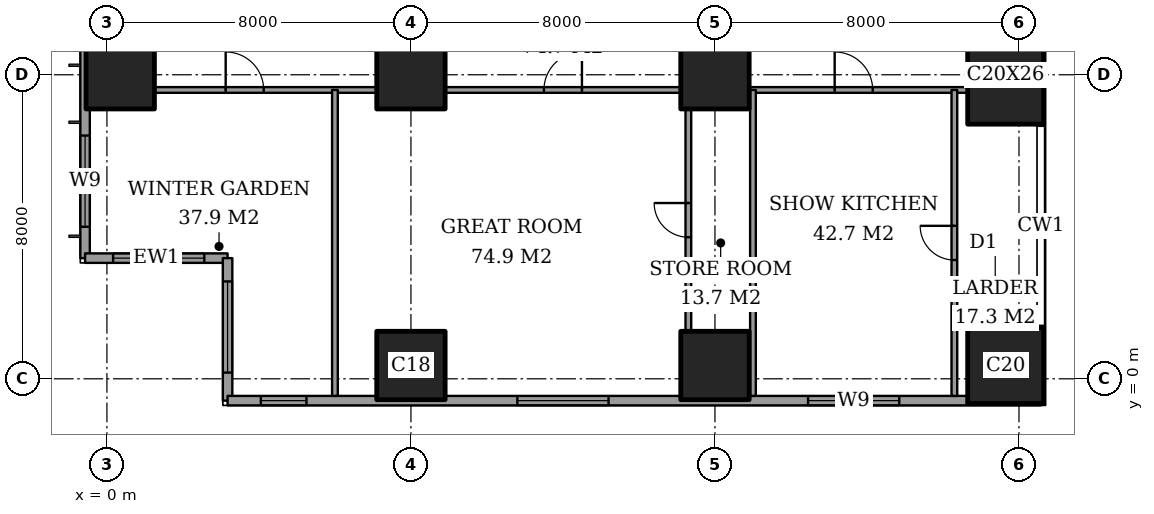
"""IFC4 building model, lengths in metres.
Left out: names, types, materials, properties, quantities, classifications, styles, units other than length and angle.
Written with IfcOpenShell. Run it as: python <this file> out.ifc"""

import sys

from ifc_helpers import new_model, si_unit, direction, frame, frame_2d, origin, origin_2d, place, context, subcontext, project, spatial, rectangle, extrude, element, fill, save


model = new_model("IFC4")
c1 = context("Model", 3, precision=1e-05, world=origin(), true_north=direction((0.0, 1.0)))
c2 = subcontext(c1, "Body", "Model", "MODEL_VIEW")
j1 = project(units=[si_unit("LENGTHUNIT", "METRE"), si_unit("PLANEANGLEUNIT", "RADIAN")], contexts=[c1])
p1 = place(None, origin())
s1 = spatial("IfcSite", under=j1, at=p1, CompositionType="ELEMENT")
p2 = place(p1, origin())
s2 = spatial("IfcBuilding", under=s1, at=p2, CompositionType="ELEMENT")
p3 = place(p2, frame((0.0, 0.0, 214.6)))
s3 = spatial("IfcBuildingStorey", under=s2, at=p3, CompositionType="ELEMENT", Elevation=214.6)
for number, where, z_axis, x_axis in (
    (1, (0.35, 8.0, 0.0), (0.0, 0.0, 1.0), (1.0, 0.0, 0.0)),
    (2, (8.0, 0.35, 0.0), (0.0, 0.0, 1.0), (1.0, 0.0, 0.0)),
    (3, (8.0, 8.0, 0.0), (0.0, 0.0, 1.0), (1.0, 0.0, 0.0)),
    (4, (16.0, 0.35, 0.0), (0.0, 0.0, 1.0), (1.0, 0.0, 0.0)),
    (5, (16.0, 8.0, 0.0), (0.0, 0.0, 1.0), (1.0, 0.0, 0.0)),
):
    element("IfcColumn", number, at=place(p3, frame(where, z_axis=z_axis, x_axis=x_axis)), inside=s3, PredefinedType="COLUMN", context=c2, shape_type="SweptSolid", body=[
        extrude(rectangle(XDim=1.8, YDim=1.8, at=origin_2d()), origin(), (0.0, 0.0, 1.0), 3.6),
    ])
p4 = place(p3, frame((23.65, 0.35, 0.0), z_axis=(0.0, 0.0, 1.0), x_axis=(1.0, 0.0, 0.0)))
e6 = element("IfcColumn", 6, at=p4, inside=s3, PredefinedType="COLUMN", context=c2, shape_type="SweptSolid", body=[
    extrude(rectangle(XDim=2.0, YDim=2.0, at=origin_2d()), origin(), (0.0, 0.0, 1.0), 3.6),
])
p5 = place(p3, frame((23.65, 8.0, 0.0), z_axis=(0.0, 0.0, 1.0), x_axis=(1.0, 0.0, 0.0)))
e7 = element("IfcColumn", 7, at=p5, inside=s3, PredefinedType="COLUMN", context=c2, shape_type="SweptSolid", body=[
    extrude(rectangle(XDim=2.0, YDim=2.6, at=origin_2d()), origin(), (0.0, 0.0, 1.0), 3.6),
])
p6 = place(p3, frame((-0.575, 44.825, 0.0), z_axis=(0.0, 0.0, 1.0), x_axis=(0.0, -1.0, 0.0)))
e8 = element("IfcWall", 8, at=p6, inside=s3, PredefinedType="SOLIDWALL", context=c2, shape_type="SweptSolid", body=[
    extrude(rectangle(XDim=41.65, YDim=0.25, at=frame_2d((20.825, 0.0))), origin(), (0.0, 0.0, 1.0), 3.6),
])
p7 = place(p6, frame((0.825, 0.0, 0.2)))
e9 = element("IfcOpeningElement", 9, at=p7, cuts=e8, PredefinedType="OPENING", context=c2, shape_type="SweptSolid", body=[
    extrude(rectangle(XDim=2.4, YDim=2.4, at=frame_2d((1.2, 1.2))), frame((0.0, 0.135, 0.0), z_axis=(0.0, -1.0, 0.0), x_axis=(1.0, 0.0, 0.0)), (0.0, 0.0, 1.0), 0.27),
])
p8 = place(p6, frame((6.05, 0.0, 0.2)))
e10 = element("IfcOpeningElement", 10, at=p8, cuts=e8, PredefinedType="OPENING", context=c2, shape_type="SweptSolid", body=[
    extrude(rectangle(XDim=1.2, YDim=2.4, at=frame_2d((0.6, 1.2))), frame((0.0, 0.135, 0.0), z_axis=(0.0, -1.0, 0.0), x_axis=(1.0, 0.0, 0.0)), (0.0, 0.0, 1.0), 0.27),
])
p9 = place(p6, frame((8.225, 0.0, 0.2)))
e11 = element("IfcOpeningElement", 11, at=p9, cuts=e8, PredefinedType="OPENING", context=c2, shape_type="SweptSolid", body=[
    extrude(rectangle(XDim=2.4, YDim=2.4, at=frame_2d((1.2, 1.2))), frame((0.0, 0.135, 0.0), z_axis=(0.0, -1.0, 0.0), x_axis=(1.0, 0.0, 0.0)), (0.0, 0.0, 1.0), 0.27),
])
p10 = place(p6, frame((15.625, 0.0, 0.2)))
e12 = element("IfcOpeningElement", 12, at=p10, cuts=e8, PredefinedType="OPENING", context=c2, shape_type="SweptSolid", body=[
    extrude(rectangle(XDim=2.4, YDim=2.4, at=frame_2d((1.2, 1.2))), frame((0.0, 0.135, 0.0), z_axis=(0.0, -1.0, 0.0), x_axis=(1.0, 0.0, 0.0)), (0.0, 0.0, 1.0), 0.27),
])
p11 = place(p6, frame((23.625, 0.0, 0.2)))
e13 = element("IfcOpeningElement", 13, at=p11, cuts=e8, PredefinedType="OPENING", context=c2, shape_type="SweptSolid", body=[
    extrude(rectangle(XDim=2.4, YDim=2.4, at=frame_2d((1.2, 1.2))), frame((0.0, 0.135, 0.0), z_axis=(0.0, -1.0, 0.0), x_axis=(1.0, 0.0, 0.0)), (0.0, 0.0, 1.0), 0.27),
])
p12 = place(p6, frame((30.775, 0.0, 0.2)))
e14 = element("IfcOpeningElement", 14, at=p12, cuts=e8, PredefinedType="OPENING", context=c2, shape_type="SweptSolid", body=[
    extrude(rectangle(XDim=2.4, YDim=2.4, at=frame_2d((1.2, 1.2))), frame((0.0, 0.135, 0.0), z_axis=(0.0, -1.0, 0.0), x_axis=(1.0, 0.0, 0.0)), (0.0, 0.0, 1.0), 0.27),
])
p13 = place(p6, frame((34.55, 0.0, 0.2)))
e15 = element("IfcOpeningElement", 15, at=p13, cuts=e8, PredefinedType="OPENING", context=c2, shape_type="SweptSolid", body=[
    extrude(rectangle(XDim=1.2, YDim=2.4, at=frame_2d((0.6, 1.2))), frame((0.0, 0.135, 0.0), z_axis=(0.0, -1.0, 0.0), x_axis=(1.0, 0.0, 0.0)), (0.0, 0.0, 1.0), 0.27),
])
p14 = place(p6, frame((38.425, 0.0, 0.2)))
e16 = element("IfcOpeningElement", 16, at=p14, cuts=e8, PredefinedType="OPENING", context=c2, shape_type="SweptSolid", body=[
    extrude(rectangle(XDim=2.4, YDim=2.4, at=frame_2d((1.2, 1.2))), frame((0.0, 0.135, 0.0), z_axis=(0.0, -1.0, 0.0), x_axis=(1.0, 0.0, 0.0)), (0.0, 0.0, 1.0), 0.27),
])
p15 = place(p3, frame((-0.575, 3.175, 0.0), z_axis=(0.0, 0.0, 1.0), x_axis=(1.0, 0.0, 0.0)))
e17 = element("IfcWall", 17, at=p15, inside=s3, PredefinedType="SOLIDWALL", context=c2, shape_type="SweptSolid", body=[
    extrude(rectangle(XDim=3.75, YDim=0.25, at=frame_2d((1.875, 0.0))), origin(), (0.0, 0.0, 1.0), 3.6),
])
p16 = place(p15, frame((0.738, 0.0, 0.2)))
e18 = element("IfcOpeningElement", 18, at=p16, cuts=e17, PredefinedType="OPENING", context=c2, shape_type="SweptSolid", body=[
    extrude(rectangle(XDim=2.4, YDim=2.4, at=frame_2d((1.2, 1.2))), frame((0.0, 0.135, 0.0), z_axis=(0.0, -1.0, 0.0), x_axis=(1.0, 0.0, 0.0)), (0.0, 0.0, 1.0), 0.27),
])
p17 = place(p3, frame((3.175, 3.175, 0.0), z_axis=(0.0, 0.0, 1.0), x_axis=(0.0, -1.0, 0.0)))
e19 = element("IfcWall", 19, at=p17, inside=s3, PredefinedType="SOLIDWALL", context=c2, shape_type="SweptSolid", body=[
    extrude(rectangle(XDim=3.75, YDim=0.25, at=frame_2d((1.875, 0.0))), origin(), (0.0, 0.0, 1.0), 3.6),
])
p18 = place(p17, frame((0.613, 0.0, 0.2)))
e20 = element("IfcOpeningElement", 20, at=p18, cuts=e19, PredefinedType="OPENING", context=c2, shape_type="SweptSolid", body=[
    extrude(rectangle(XDim=2.4, YDim=2.4, at=frame_2d((1.2, 1.2))), frame((0.0, 0.135, 0.0), z_axis=(0.0, -1.0, 0.0), x_axis=(1.0, 0.0, 0.0)), (0.0, 0.0, 1.0), 0.27),
])
p19 = place(p3, frame((3.175, -0.575, 0.0), z_axis=(0.0, 0.0, 1.0), x_axis=(1.0, 0.0, 0.0)))
e21 = element("IfcWall", 21, at=p19, inside=s3, PredefinedType="SOLIDWALL", context=c2, shape_type="SweptSolid", body=[
    extrude(rectangle(XDim=21.4, YDim=0.25, at=frame_2d((10.7, 0.0))), origin(), (0.0, 0.0, 1.0), 3.6),
])
p20 = place(p19, frame((0.875, 0.0, 0.2)))
e22 = element("IfcOpeningElement", 22, at=p20, cuts=e21, PredefinedType="OPENING", context=c2, shape_type="SweptSolid", body=[
    extrude(rectangle(XDim=1.2, YDim=2.4, at=frame_2d((0.6, 1.2))), frame((0.0, 0.135, 0.0), z_axis=(0.0, -1.0, 0.0), x_axis=(1.0, 0.0, 0.0)), (0.0, 0.0, 1.0), 0.27),
])
p21 = place(p19, frame((7.625, 0.0, 0.2)))
e23 = element("IfcOpeningElement", 23, at=p21, cuts=e21, PredefinedType="OPENING", context=c2, shape_type="SweptSolid", body=[
    extrude(rectangle(XDim=2.4, YDim=2.4, at=frame_2d((1.2, 1.2))), frame((0.0, 0.135, 0.0), z_axis=(0.0, -1.0, 0.0), x_axis=(1.0, 0.0, 0.0)), (0.0, 0.0, 1.0), 0.27),
])
p22 = place(p19, frame((15.275, 0.0, 0.2)))
e24 = element("IfcOpeningElement", 24, at=p22, cuts=e21, PredefinedType="OPENING", context=c2, shape_type="SweptSolid", body=[
    extrude(rectangle(XDim=2.4, YDim=2.4, at=frame_2d((1.2, 1.2))), frame((0.0, 0.135, 0.0), z_axis=(0.0, -1.0, 0.0), x_axis=(1.0, 0.0, 0.0)), (0.0, 0.0, 1.0), 0.27),
])
p23 = place(p3, frame((1.25, 7.6, 0.0), z_axis=(0.0, 0.0, 1.0), x_axis=(1.0, 0.0, 0.0)))
e25 = element("IfcWall", 25, at=p23, inside=s3, PredefinedType="PARTITIONING", context=c2, shape_type="SweptSolid", body=[
    extrude(rectangle(XDim=5.85, YDim=0.15, at=frame_2d((2.925, 0.0))), origin(), (0.0, 0.0, 1.0), 3.35),
])
p24 = place(p23, frame((1.875, 0.0, 0.0)))
e26 = element("IfcOpeningElement", 26, at=p24, cuts=e25, PredefinedType="OPENING", context=c2, shape_type="SweptSolid", body=[
    extrude(rectangle(XDim=1.0, YDim=2.1, at=frame_2d((0.5, 1.05))), frame((0.0, 0.085, 0.0), z_axis=(0.0, -1.0, 0.0), x_axis=(1.0, 0.0, 0.0)), (0.0, 0.0, 1.0), 0.17),
])
p25 = place(p3, frame((8.9, 7.6, 0.0), z_axis=(0.0, 0.0, 1.0), x_axis=(1.0, 0.0, 0.0)))
e27 = element("IfcWall", 27, at=p25, inside=s3, PredefinedType="PARTITIONING", context=c2, shape_type="SweptSolid", body=[
    extrude(rectangle(XDim=6.2, YDim=0.15, at=frame_2d((3.1, 0.0))), origin(), (0.0, 0.0, 1.0), 3.35),
])
p26 = place(p25, frame((2.6, 0.0, 0.0)))
e28 = element("IfcOpeningElement", 28, at=p26, cuts=e27, PredefinedType="OPENING", context=c2, shape_type="SweptSolid", body=[
    extrude(rectangle(XDim=1.0, YDim=2.1, at=frame_2d((0.5, 1.05))), frame((0.0, 0.085, 0.0), z_axis=(0.0, -1.0, 0.0), x_axis=(1.0, 0.0, 0.0)), (0.0, 0.0, 1.0), 0.17),
])
p27 = place(p3, frame((16.9, 7.6, 0.0), z_axis=(0.0, 0.0, 1.0), x_axis=(1.0, 0.0, 0.0)))
e29 = element("IfcWall", 29, at=p27, inside=s3, PredefinedType="PARTITIONING", context=c2, shape_type="SweptSolid", body=[
    extrude(rectangle(XDim=5.75, YDim=0.15, at=frame_2d((2.875, 0.0))), origin(), (0.0, 0.0, 1.0), 3.35),
])
p28 = place(p27, frame((2.25, 0.0, 0.0)))
e30 = element("IfcOpeningElement", 30, at=p28, cuts=e29, PredefinedType="OPENING", context=c2, shape_type="SweptSolid", body=[
    extrude(rectangle(XDim=1.0, YDim=2.1, at=frame_2d((0.5, 1.05))), frame((0.0, 0.085, 0.0), z_axis=(0.0, -1.0, 0.0), x_axis=(1.0, 0.0, 0.0)), (0.0, 0.0, 1.0), 0.17),
])
p29 = place(p3, frame((6.0, -0.45, 0.0), z_axis=(0.0, 0.0, 1.0), x_axis=(0.0, 1.0, 0.0)))
e31 = element("IfcWall", 31, at=p29, inside=s3, PredefinedType="PARTITIONING", context=c2, shape_type="SweptSolid", body=[
    extrude(rectangle(XDim=8.05, YDim=0.15, at=frame_2d((4.025, 0.0))), origin(), (0.0, 0.0, 1.0), 3.35),
])
p30 = place(p3, frame((15.3, 1.25, 0.0), z_axis=(0.0, 0.0, 1.0), x_axis=(0.0, 1.0, 0.0)))
e32 = element("IfcWall", 32, at=p30, inside=s3, PredefinedType="PARTITIONING", context=c2, shape_type="SweptSolid", body=[
    extrude(rectangle(XDim=5.85, YDim=0.15, at=frame_2d((2.925, 0.0))), origin(), (0.0, 0.0, 1.0), 3.35),
])
p31 = place(p30, frame((2.475, 0.0, 0.0)))
e33 = element("IfcOpeningElement", 33, at=p31, cuts=e32, PredefinedType="OPENING", context=c2, shape_type="SweptSolid", body=[
    extrude(rectangle(XDim=0.9, YDim=2.1, at=frame_2d((0.45, 1.05))), frame((0.0, 0.085, 0.0), z_axis=(0.0, -1.0, 0.0), x_axis=(1.0, 0.0, 0.0)), (0.0, 0.0, 1.0), 0.17),
])
p32 = place(p3, frame((17.0, -0.45, 0.0), z_axis=(0.0, 0.0, 1.0), x_axis=(0.0, 1.0, 0.0)))
e34 = element("IfcWall", 34, at=p32, inside=s3, PredefinedType="PARTITIONING", context=c2, shape_type="SweptSolid", body=[
    extrude(rectangle(XDim=8.05, YDim=0.15, at=frame_2d((4.025, 0.0))), origin(), (0.0, 0.0, 1.0), 3.35),
])
p33 = place(p3, frame((22.3, -0.45, 0.0), z_axis=(0.0, 0.0, 1.0), x_axis=(0.0, 1.0, 0.0)))
e35 = element("IfcWall", 35, at=p33, inside=s3, PredefinedType="PARTITIONING", context=c2, shape_type="SweptSolid", body=[
    extrude(rectangle(XDim=8.05, YDim=0.15, at=frame_2d((4.025, 0.0))), origin(), (0.0, 0.0, 1.0), 3.35),
])
p34 = place(p33, frame((3.575, 0.0, 0.0)))
e36 = element("IfcOpeningElement", 36, at=p34, cuts=e35, PredefinedType="OPENING", context=c2, shape_type="SweptSolid", body=[
    extrude(rectangle(XDim=0.9, YDim=2.1, at=frame_2d((0.45, 1.05))), frame((0.0, 0.085, 0.0), z_axis=(0.0, -1.0, 0.0), x_axis=(1.0, 0.0, 0.0)), (0.0, 0.0, 1.0), 0.17),
])
p35 = place(p14, origin())
e37 = element("IfcWindow", 37, at=p35, inside=s3, PartitioningType="SINGLE_PANEL", PredefinedType="WINDOW", context=c2, shape_type="SweptSolid", body=[
    extrude(rectangle(XDim=2.4, YDim=2.4, at=frame_2d((1.2, 1.2))), frame((0.0, 0.03, 0.0), z_axis=(0.0, -1.0, 0.0), x_axis=(1.0, 0.0, 0.0)), (0.0, 0.0, 1.0), 0.06),
])
fill(e16, e37)
p36 = place(p16, origin())
e38 = element("IfcWindow", 38, at=p36, inside=s3, PartitioningType="SINGLE_PANEL", PredefinedType="WINDOW", context=c2, shape_type="SweptSolid", body=[
    extrude(rectangle(XDim=2.4, YDim=2.4, at=frame_2d((1.2, 1.2))), frame((0.0, 0.03, 0.0), z_axis=(0.0, -1.0, 0.0), x_axis=(1.0, 0.0, 0.0)), (0.0, 0.0, 1.0), 0.06),
])
fill(e18, e38)
p37 = place(p18, origin())
e39 = element("IfcWindow", 39, at=p37, inside=s3, PartitioningType="SINGLE_PANEL", PredefinedType="WINDOW", context=c2, shape_type="SweptSolid", body=[
    extrude(rectangle(XDim=2.4, YDim=2.4, at=frame_2d((1.2, 1.2))), frame((0.0, 0.03, 0.0), z_axis=(0.0, -1.0, 0.0), x_axis=(1.0, 0.0, 0.0)), (0.0, 0.0, 1.0), 0.06),
])
fill(e20, e39)
p38 = place(p20, origin())
e40 = element("IfcWindow", 40, at=p38, inside=s3, PartitioningType="SINGLE_PANEL", PredefinedType="WINDOW", context=c2, shape_type="SweptSolid", body=[
    extrude(rectangle(XDim=1.2, YDim=2.4, at=frame_2d((0.6, 1.2))), frame((0.0, 0.03, 0.0), z_axis=(0.0, -1.0, 0.0), x_axis=(1.0, 0.0, 0.0)), (0.0, 0.0, 1.0), 0.06),
])
fill(e22, e40)
p39 = place(p21, origin())
e41 = element("IfcWindow", 41, at=p39, inside=s3, PartitioningType="SINGLE_PANEL", PredefinedType="WINDOW", context=c2, shape_type="SweptSolid", body=[
    extrude(rectangle(XDim=2.4, YDim=2.4, at=frame_2d((1.2, 1.2))), frame((0.0, 0.03, 0.0), z_axis=(0.0, -1.0, 0.0), x_axis=(1.0, 0.0, 0.0)), (0.0, 0.0, 1.0), 0.06),
])
fill(e23, e41)
p40 = place(p22, origin())
e42 = element("IfcWindow", 42, at=p40, inside=s3, PartitioningType="SINGLE_PANEL", PredefinedType="WINDOW", context=c2, shape_type="SweptSolid", body=[
    extrude(rectangle(XDim=2.4, YDim=2.4, at=frame_2d((1.2, 1.2))), frame((0.0, 0.03, 0.0), z_axis=(0.0, -1.0, 0.0), x_axis=(1.0, 0.0, 0.0)), (0.0, 0.0, 1.0), 0.06),
])
fill(e24, e42)
p41 = place(p24, origin())
e43 = element("IfcDoor", 43, at=p41, inside=s3, OperationType="SINGLE_SWING_RIGHT", PredefinedType="DOOR", context=c2, shape_type="SweptSolid", body=[
    extrude(rectangle(XDim=1.0, YDim=2.1, at=frame_2d((0.5, 1.05))), frame((0.0, 0.025, 0.0), z_axis=(0.0, -1.0, 0.0), x_axis=(1.0, 0.0, 0.0)), (0.0, 0.0, 1.0), 0.05),
])
fill(e26, e43)
p42 = place(p26, origin())
e44 = element("IfcDoor", 44, at=p42, inside=s3, OperationType="SINGLE_SWING_LEFT", PredefinedType="DOOR", context=c2, shape_type="SweptSolid", body=[
    extrude(rectangle(XDim=1.0, YDim=2.1, at=frame_2d((0.5, 1.05))), frame((0.0, 0.025, 0.0), z_axis=(0.0, -1.0, 0.0), x_axis=(1.0, 0.0, 0.0)), (0.0, 0.0, 1.0), 0.05),
])
fill(e28, e44)
p43 = place(p31, origin())
e45 = element("IfcDoor", 45, at=p43, inside=s3, OperationType="SINGLE_SWING_LEFT", PredefinedType="DOOR", context=c2, shape_type="SweptSolid", body=[
    extrude(rectangle(XDim=0.9, YDim=2.1, at=frame_2d((0.45, 1.05))), frame((0.0, 0.025, 0.0), z_axis=(0.0, -1.0, 0.0), x_axis=(1.0, 0.0, 0.0)), (0.0, 0.0, 1.0), 0.05),
])
fill(e33, e45)
p44 = place(p28, origin())
e46 = element("IfcDoor", 46, at=p44, inside=s3, OperationType="SINGLE_SWING_RIGHT", PredefinedType="DOOR", context=c2, shape_type="SweptSolid", body=[
    extrude(rectangle(XDim=1.0, YDim=2.1, at=frame_2d((0.5, 1.05))), frame((0.0, 0.025, 0.0), z_axis=(0.0, -1.0, 0.0), x_axis=(1.0, 0.0, 0.0)), (0.0, 0.0, 1.0), 0.05),
])
fill(e30, e46)
p45 = place(p34, origin())
e47 = element("IfcDoor", 47, at=p45, inside=s3, OperationType="SINGLE_SWING_LEFT", PredefinedType="DOOR", context=c2, shape_type="SweptSolid", body=[
    extrude(rectangle(XDim=0.9, YDim=2.1, at=frame_2d((0.45, 1.05))), frame((0.0, 0.025, 0.0), z_axis=(0.0, -1.0, 0.0), x_axis=(1.0, 0.0, 0.0)), (0.0, 0.0, 1.0), 0.05),
])
fill(e36, e47)
save(model, sys.argv[1])
